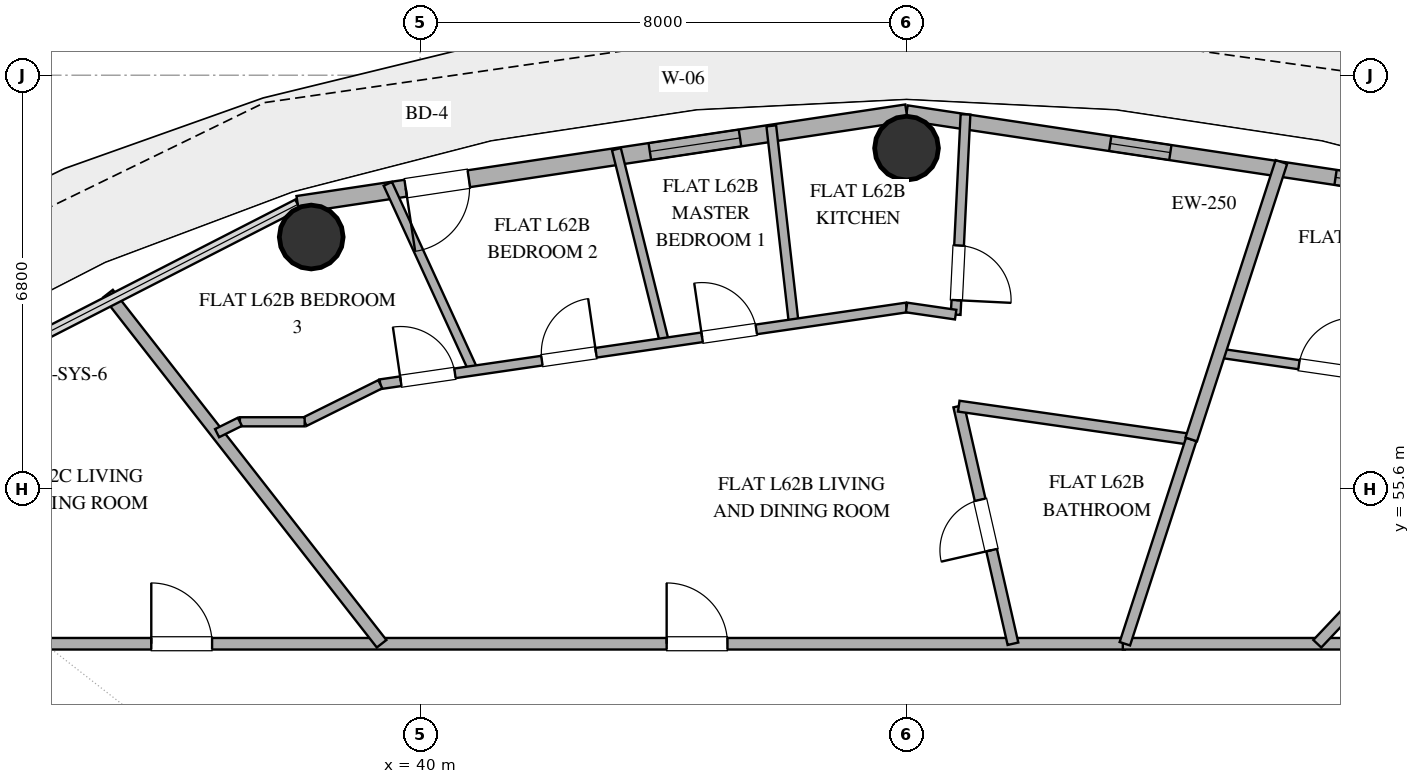
"""IFC4 building model, lengths in metres.
Left out: names, types, materials, properties, quantities, classifications, styles, units other than length and angle.
Written with IfcOpenShell. Run it as: python <this file> out.ifc"""

import sys

from ifc_helpers import new_model, si_unit, direction, frame, frame_2d, origin, origin_2d, place, context, subcontext, project, spatial, rectangle, hollow_circle, extrude, element, fill, save


model = new_model("IFC4")
c1 = context("Model", 3, precision=1e-05, world=origin(), true_north=direction((0.0, 1.0)))
c2 = subcontext(c1, "Body", "Model", "MODEL_VIEW")
j1 = project(units=[si_unit("LENGTHUNIT", "METRE"), si_unit("PLANEANGLEUNIT", "RADIAN")], contexts=[c1])
p1 = place(None, origin())
s1 = spatial("IfcSite", under=j1, at=p1, CompositionType="ELEMENT")
p2 = place(p1, origin())
s2 = spatial("IfcBuilding", under=s1, at=p2, CompositionType="ELEMENT")
p3 = place(p2, frame((0.0, 0.0, 242.4)))
s3 = spatial("IfcBuildingStorey", under=s2, at=p3, CompositionType="ELEMENT", Elevation=242.4)
for number, where, z_axis, x_axis in (
    (1, (48.0, 61.2, 0.0), (0.0, 0.0, 1.0), (1.0, 0.0, 0.0)),
    (2, (38.209, 59.739, 0.0), (0.0, 0.0, 1.0), (1.0, 0.0, 0.0)),
):
    element("IfcColumn", number, at=place(p3, frame(where, z_axis=z_axis, x_axis=x_axis)), inside=s3, PredefinedType="COLUMN", context=c2, shape_type="SweptSolid", body=[
        extrude(hollow_circle(Radius=0.525, WallThickness=0.028, at=origin_2d()), origin(), (0.0, 0.0, 1.0), 3.36),
    ])
p4 = place(p3, frame((58.013, 60.274, 0.0), z_axis=(0.0, 0.0, 1.0), x_axis=(-0.988882522213, 0.148698881169, 0.0)))
e3 = element("IfcWall", 3, at=p4, inside=s3, PredefinedType="SOLIDWALL", context=c2, shape_type="SweptSolid", body=[
    extrude(rectangle(XDim=10.125, YDim=0.25, at=frame_2d((5.062, 0.0))), origin(), (0.0, 0.0, 1.0), 3.36),
])
p5 = place(p4, frame((1.99, 0.0, 1.42)))
e4 = element("IfcOpeningElement", 4, at=p5, cuts=e3, PredefinedType="OPENING", context=c2, shape_type="SweptSolid", body=[
    extrude(rectangle(XDim=1.0, YDim=1.05, at=frame_2d((0.5, 0.525))), frame((0.0, 0.135, 0.0), z_axis=(0.0, -1.0, 0.0), x_axis=(1.0, 0.0, 0.0)), (0.0, 0.0, 1.0), 0.27),
])
p6 = place(p4, frame((5.738, 0.0, 0.35)))
e5 = element("IfcOpeningElement", 5, at=p6, cuts=e3, PredefinedType="OPENING", context=c2, shape_type="SweptSolid", body=[
    extrude(rectangle(XDim=1.0, YDim=1.05, at=frame_2d((0.5, 0.525))), frame((0.0, 0.135, 0.0), z_axis=(0.0, -1.0, 0.0), x_axis=(1.0, 0.0, 0.0)), (0.0, 0.0, 1.0), 0.27),
])
p7 = place(p3, frame((48.0, 61.78, 0.0), z_axis=(0.0, 0.0, 1.0), x_axis=(-0.988882522213, -0.148698881169, 0.0)))
e6 = element("IfcWall", 6, at=p7, inside=s3, PredefinedType="SOLIDWALL", context=c2, shape_type="SweptSolid", body=[
    extrude(rectangle(XDim=10.125, YDim=0.28, at=frame_2d((5.062, 0.0))), origin(), (0.0, 0.0, 1.0), 3.36),
])
p8 = place(p7, frame((2.769, 0.0, 0.85)))
e7 = element("IfcOpeningElement", 7, at=p8, cuts=e6, PredefinedType="OPENING", context=c2, shape_type="SweptSolid", body=[
    extrude(rectangle(XDim=1.5, YDim=2.0, at=frame_2d((0.75, 1.0))), frame((0.0, 0.15, 0.0), z_axis=(0.0, -1.0, 0.0), x_axis=(1.0, 0.0, 0.0)), (0.0, 0.0, 1.0), 0.3),
])
p9 = place(p7, frame((7.28, 0.0, 0.0)))
e8 = element("IfcOpeningElement", 8, at=p9, cuts=e6, PredefinedType="OPENING", context=c2, shape_type="SweptSolid", body=[
    extrude(rectangle(XDim=1.05, YDim=2.2, at=frame_2d((0.525, 1.1))), frame((0.0, 0.15, 0.0), z_axis=(0.0, -1.0, 0.0), x_axis=(1.0, 0.0, 0.0)), (0.0, 0.0, 1.0), 0.3),
])
p10 = place(p3, frame((32.75, 53.05, 0.0), z_axis=(0.0, 0.0, 1.0), x_axis=(1.0, 0.0, 0.0)))
e9 = element("IfcWall", 9, at=p10, inside=s3, PredefinedType="PARTITIONING", context=c2, shape_type="SweptSolid", body=[
    extrude(rectangle(XDim=18.84, YDim=0.19, at=frame_2d((9.42, 0.0))), origin(), (0.0, 0.0, 1.0), 2.72),
])
p11 = place(p10, frame((11.305, 0.0, 0.0)))
e10 = element("IfcOpeningElement", 10, at=p11, cuts=e9, PredefinedType="OPENING", context=c2, shape_type="SweptSolid", body=[
    extrude(rectangle(XDim=1.0, YDim=2.2, at=frame_2d((0.5, 1.1))), frame((0.0, 0.105, 0.0), z_axis=(0.0, -1.0, 0.0), x_axis=(1.0, 0.0, 0.0)), (0.0, 0.0, 1.0), 0.21),
])
p12 = place(p10, frame((2.829, 0.0, 0.0)))
e11 = element("IfcOpeningElement", 11, at=p12, cuts=e9, PredefinedType="OPENING", context=c2, shape_type="SweptSolid", body=[
    extrude(rectangle(XDim=1.0, YDim=2.2, at=frame_2d((0.5, 1.1))), frame((0.0, 0.105, 0.0), z_axis=(0.0, -1.0, 0.0), x_axis=(1.0, 0.0, 0.0)), (0.0, 0.0, 1.0), 0.21),
])
p13 = place(p3, frame((51.557, 53.05, 0.0), z_axis=(0.0, 0.0, 1.0), x_axis=(1.0, 0.0, 0.0)))
e12 = element("IfcWall", 12, at=p13, inside=s3, PredefinedType="PARTITIONING", context=c2, shape_type="SweptSolid", body=[
    extrude(rectangle(XDim=11.693, YDim=0.19, at=frame_2d((5.847, 0.0))), origin(), (0.0, 0.0, 1.0), 2.72),
])
p14 = place(p3, frame((39.367, 53.05, 0.0), z_axis=(0.0, 0.0, 1.0), x_axis=(-0.615657656631, 0.788013737083, 0.0)))
e13 = element("IfcWall", 13, at=p14, inside=s3, PredefinedType="PARTITIONING", context=c2, shape_type="SweptSolid", body=[
    extrude(rectangle(XDim=7.308, YDim=0.2, at=frame_2d((3.654, 0.0))), origin(), (0.0, 0.0, 1.0), 2.72),
])
p15 = place(p3, frame((49.75, 53.05, 0.0), z_axis=(0.0, 0.0, 1.0), x_axis=(-0.222474116201, 0.974938596846, 0.0)))
e14 = element("IfcWall", 14, at=p15, inside=s3, PredefinedType="PLUMBINGWALL", context=c2, shape_type="SweptSolid", body=[
    extrude(rectangle(XDim=4.008, YDim=0.18, at=frame_2d((2.004, 0.0))), origin(), (0.0, 0.0, 1.0), 2.72),
])
p16 = place(p15, frame((1.579, 0.0, 0.0)))
e15 = element("IfcOpeningElement", 15, at=p16, cuts=e14, PredefinedType="OPENING", context=c2, shape_type="SweptSolid", body=[
    extrude(rectangle(XDim=0.85, YDim=2.1, at=frame_2d((0.425, 1.05))), frame((0.0, 0.1, 0.0), z_axis=(0.0, -1.0, 0.0), x_axis=(1.0, 0.0, 0.0)), (0.0, 0.0, 1.0), 0.2),
])
p17 = place(p3, frame((48.859, 56.957, 0.0), z_axis=(0.0, 0.0, 1.0), x_axis=(0.989916598229, -0.141651433282, 0.0)))
e16 = element("IfcWall", 16, at=p17, inside=s3, PredefinedType="PLUMBINGWALL", context=c2, shape_type="SweptSolid", body=[
    extrude(rectangle(XDim=3.863, YDim=0.18, at=frame_2d((1.931, 0.0))), origin(), (0.0, 0.0, 1.0), 2.72),
])
p18 = place(p3, frame((53.144, 57.83, 0.0), z_axis=(0.0, 0.0, 1.0), x_axis=(0.98952683964, -0.144348999414, 0.0)))
e17 = element("IfcWall", 17, at=p18, inside=s3, PredefinedType="PARTITIONING", context=c2, shape_type="SweptSolid", body=[
    extrude(rectangle(XDim=3.548, YDim=0.15, at=frame_2d((1.774, 0.0))), origin(), (0.0, 0.0, 1.0), 2.72),
])
p19 = place(p18, frame((1.324, 0.0, 0.0)))
e18 = element("IfcOpeningElement", 18, at=p19, cuts=e17, PredefinedType="OPENING", context=c2, shape_type="SweptSolid", body=[
    extrude(rectangle(XDim=0.9, YDim=2.1, at=frame_2d((0.45, 1.05))), frame((0.0, 0.085, 0.0), z_axis=(0.0, -1.0, 0.0), x_axis=(1.0, 0.0, 0.0)), (0.0, 0.0, 1.0), 0.17),
])
p20 = place(p3, frame((52.682, 56.41, 0.0), z_axis=(0.0, 0.0, 1.0), x_axis=(-0.309025133622, -0.951053871655, 0.0)))
e19 = element("IfcWall", 19, at=p20, inside=s3, PredefinedType="PLUMBINGWALL", context=c2, shape_type="SweptSolid", body=[
    extrude(rectangle(XDim=3.533, YDim=0.18, at=frame_2d((1.767, 0.0))), origin(), (0.0, 0.0, 1.0), 2.72),
])
p21 = place(p3, frame((40.877, 57.541, 0.0), z_axis=(0.0, 0.0, 1.0), x_axis=(-0.41664724869, 0.90906824285, 0.0)))
e20 = element("IfcWall", 20, at=p21, inside=s3, PredefinedType="PARTITIONING", context=c2, shape_type="SweptSolid", body=[
    extrude(rectangle(XDim=3.38, YDim=0.15, at=frame_2d((1.69, 0.0))), origin(), (0.0, 0.0, 1.0), 2.72),
])
p22 = place(p3, frame((54.165, 60.973, 0.0), z_axis=(0.0, 0.0, 1.0), x_axis=(-0.309012424199, -0.951058001223, 0.0)))
e21 = element("IfcWall", 21, at=p22, inside=s3, PredefinedType="PARTITIONING", context=c2, shape_type="SweptSolid", body=[
    extrude(rectangle(XDim=4.797, YDim=0.2, at=frame_2d((2.399, 0.0))), origin(), (0.0, 0.0, 1.0), 2.72),
])
p23 = place(p3, frame((57.021, 55.446, 0.0), z_axis=(0.0, 0.0, 1.0), x_axis=(-0.686947406922, -0.726707135044, 0.0)))
e22 = element("IfcWall", 22, at=p23, inside=s3, PredefinedType="PLUMBINGWALL", context=c2, shape_type="SweptSolid", body=[
    extrude(rectangle(XDim=3.297, YDim=0.18, at=frame_2d((1.649, 0.0))), origin(), (0.0, 0.0, 1.0), 2.72),
])
p24 = place(p23, frame((1.224, 0.0, 0.0)))
e23 = element("IfcOpeningElement", 23, at=p24, cuts=e22, PredefinedType="OPENING", context=c2, shape_type="SweptSolid", body=[
    extrude(rectangle(XDim=0.85, YDim=2.1, at=frame_2d((0.425, 1.05))), frame((0.0, 0.1, 0.0), z_axis=(0.0, -1.0, 0.0), x_axis=(1.0, 0.0, 0.0)), (0.0, 0.0, 1.0), 0.2),
])
p25 = place(p3, frame((48.969, 61.755, 0.0), z_axis=(0.0, 0.0, 1.0), x_axis=(-0.04902528139, -0.998797537935, 0.0)))
e24 = element("IfcWall", 24, at=p25, inside=s3, PredefinedType="PLUMBINGWALL", context=c2, shape_type="SweptSolid", body=[
    extrude(rectangle(XDim=3.297, YDim=0.16, at=frame_2d((1.648, 0.0))), origin(), (0.0, 0.0, 1.0), 2.72),
])
p26 = place(p25, frame((2.158, 0.0, 0.0)))
e25 = element("IfcOpeningElement", 25, at=p26, cuts=e24, PredefinedType="OPENING", context=c2, shape_type="SweptSolid", body=[
    extrude(rectangle(XDim=0.9, YDim=2.1, at=frame_2d((0.45, 1.05))), frame((0.0, 0.09, 0.0), z_axis=(0.0, -1.0, 0.0), x_axis=(1.0, 0.0, 0.0)), (0.0, 0.0, 1.0), 0.18),
])
p27 = place(p3, frame((43.229, 61.183, 0.0), z_axis=(0.0, 0.0, 1.0), x_axis=(0.241414802643, -0.970422018023, 0.0)))
e26 = element("IfcWall", 26, at=p27, inside=s3, PredefinedType="PARTITIONING", context=c2, shape_type="SweptSolid", body=[
    extrude(rectangle(XDim=3.281, YDim=0.15, at=frame_2d((1.64, 0.0))), origin(), (0.0, 0.0, 1.0), 2.72),
])
p28 = place(p3, frame((46.146, 58.31, 0.0), z_axis=(0.0, 0.0, 1.0), x_axis=(-0.11298154415, 0.993597086691, 0.0)))
e27 = element("IfcWall", 27, at=p28, inside=s3, PredefinedType="PLUMBINGWALL", context=c2, shape_type="SweptSolid", body=[
    extrude(rectangle(XDim=3.278, YDim=0.16, at=frame_2d((1.639, 0.0))), origin(), (0.0, 0.0, 1.0), 2.72),
])
p29 = place(p3, frame((39.345, 57.318, 0.0), z_axis=(0.0, 0.0, 1.0), x_axis=(0.989540121389, 0.144257922351, 0.0)))
e28 = element("IfcWall", 28, at=p29, inside=s3, PredefinedType="PLUMBINGWALL", context=c2, shape_type="SweptSolid", body=[
    extrude(rectangle(XDim=8.746, YDim=0.16, at=frame_2d((4.373, 0.0))), origin(), (0.0, 0.0, 1.0), 2.72),
])
p30 = place(p29, frame((2.686, 0.0, 0.0)))
e29 = element("IfcOpeningElement", 29, at=p30, cuts=e28, PredefinedType="OPENING", context=c2, shape_type="SweptSolid", body=[
    extrude(rectangle(XDim=0.9, YDim=2.1, at=frame_2d((0.45, 1.05))), frame((0.0, 0.09, 0.0), z_axis=(0.0, -1.0, 0.0), x_axis=(1.0, 0.0, 0.0)), (0.0, 0.0, 1.0), 0.18),
])
p31 = place(p29, frame((5.349, 0.0, 0.0)))
e30 = element("IfcOpeningElement", 30, at=p31, cuts=e28, PredefinedType="OPENING", context=c2, shape_type="SweptSolid", body=[
    extrude(rectangle(XDim=0.9, YDim=2.1, at=frame_2d((0.45, 1.05))), frame((0.0, 0.09, 0.0), z_axis=(0.0, -1.0, 0.0), x_axis=(1.0, 0.0, 0.0)), (0.0, 0.0, 1.0), 0.18),
])
p32 = place(p29, frame((0.341, 0.0, 0.0)))
e31 = element("IfcOpeningElement", 31, at=p32, cuts=e28, PredefinedType="OPENING", context=c2, shape_type="SweptSolid", body=[
    extrude(rectangle(XDim=0.9, YDim=2.1, at=frame_2d((0.45, 1.05))), frame((0.0, 0.09, 0.0), z_axis=(0.0, -1.0, 0.0), x_axis=(1.0, 0.0, 0.0)), (0.0, 0.0, 1.0), 0.18),
])
p33 = place(p3, frame((38.101, 56.7, 0.0), z_axis=(0.0, 0.0, 1.0), x_axis=(0.895584310315, 0.444891833053, 0.0)))
e32 = element("IfcWall", 32, at=p33, inside=s3, PredefinedType="PARTITIONING", context=c2, shape_type="SweptSolid", body=[
    extrude(rectangle(XDim=1.389, YDim=0.15, at=frame_2d((0.694, 0.0))), origin(), (0.0, 0.0, 1.0), 2.72),
])
p34 = place(p3, frame((37.036, 56.7, 0.0), z_axis=(0.0, 0.0, 1.0), x_axis=(1.0, 0.0, 0.0)))
e33 = element("IfcWall", 33, at=p34, inside=s3, PredefinedType="PARTITIONING", context=c2, shape_type="SweptSolid", body=[
    extrude(rectangle(XDim=1.065, YDim=0.15, at=frame_2d((0.533, 0.0))), origin(), (0.0, 0.0, 1.0), 2.72),
])
p35 = place(p3, frame((48.808, 58.462, 0.0), z_axis=(0.0, 0.0, 1.0), x_axis=(-0.989514290885, 0.144434996222, 0.0)))
e34 = element("IfcWall", 34, at=p35, inside=s3, PredefinedType="PLUMBINGWALL", context=c2, shape_type="SweptSolid", body=[
    extrude(rectangle(XDim=0.816, YDim=0.16, at=frame_2d((0.408, 0.0))), origin(), (0.0, 0.0, 1.0), 2.72),
])
p36 = place(p3, frame((36.661, 56.513, 0.0), z_axis=(0.0, 0.0, 1.0), x_axis=(0.895473432012, 0.445114965554, 0.0)))
e35 = element("IfcWall", 35, at=p36, inside=s3, PredefinedType="PARTITIONING", context=c2, shape_type="SweptSolid", body=[
    extrude(rectangle(XDim=0.419, YDim=0.15, at=frame_2d((0.209, 0.0))), origin(), (0.0, 0.0, 1.0), 2.72),
])
p37 = place(p8, origin())
e36 = element("IfcWindow", 36, at=p37, inside=s3, PartitioningType="SINGLE_PANEL", PredefinedType="WINDOW", context=c2, shape_type="SweptSolid", body=[
    extrude(rectangle(XDim=1.5, YDim=2.0, at=frame_2d((0.75, 1.0))), frame((0.0, 0.03, 0.0), z_axis=(0.0, -1.0, 0.0), x_axis=(1.0, 0.0, 0.0)), (0.0, 0.0, 1.0), 0.06),
])
fill(e7, e36)
p38 = place(p9, origin())
e37 = element("IfcDoor", 37, at=p38, inside=s3, OperationType="SINGLE_SWING_RIGHT", PredefinedType="DOOR", context=c2, shape_type="SweptSolid", body=[
    extrude(rectangle(XDim=1.05, YDim=2.2, at=frame_2d((0.525, 1.1))), frame((0.0, 0.025, 0.0), z_axis=(0.0, -1.0, 0.0), x_axis=(1.0, 0.0, 0.0)), (0.0, 0.0, 1.0), 0.05),
])
fill(e8, e37)
p39 = place(p5, origin())
e38 = element("IfcWindow", 38, at=p39, inside=s3, PartitioningType="SINGLE_PANEL", PredefinedType="WINDOW", context=c2, shape_type="SweptSolid", body=[
    extrude(rectangle(XDim=1.0, YDim=1.05, at=frame_2d((0.5, 0.525))), frame((0.0, 0.03, 0.0), z_axis=(0.0, -1.0, 0.0), x_axis=(1.0, 0.0, 0.0)), (0.0, 0.0, 1.0), 0.06),
])
fill(e4, e38)
p40 = place(p6, origin())
e39 = element("IfcWindow", 39, at=p40, inside=s3, PartitioningType="SINGLE_PANEL", PredefinedType="WINDOW", context=c2, shape_type="SweptSolid", body=[
    extrude(rectangle(XDim=1.0, YDim=1.05, at=frame_2d((0.5, 0.525))), frame((0.0, 0.03, 0.0), z_axis=(0.0, -1.0, 0.0), x_axis=(1.0, 0.0, 0.0)), (0.0, 0.0, 1.0), 0.06),
])
fill(e5, e39)
p41 = place(p11, origin())
e40 = element("IfcDoor", 40, at=p41, inside=s3, OperationType="SINGLE_SWING_LEFT", PredefinedType="DOOR", context=c2, shape_type="SweptSolid", body=[
    extrude(rectangle(XDim=1.0, YDim=2.2, at=frame_2d((0.5, 1.1))), frame((0.0, 0.025, 0.0), z_axis=(0.0, -1.0, 0.0), x_axis=(1.0, 0.0, 0.0)), (0.0, 0.0, 1.0), 0.05),
])
fill(e10, e40)
p42 = place(p12, origin())
e41 = element("IfcDoor", 41, at=p42, inside=s3, OperationType="SINGLE_SWING_LEFT", PredefinedType="DOOR", context=c2, shape_type="SweptSolid", body=[
    extrude(rectangle(XDim=1.0, YDim=2.2, at=frame_2d((0.5, 1.1))), frame((0.0, 0.025, 0.0), z_axis=(0.0, -1.0, 0.0), x_axis=(1.0, 0.0, 0.0)), (0.0, 0.0, 1.0), 0.05),
])
fill(e11, e41)
p43 = place(p16, origin())
e42 = element("IfcDoor", 42, at=p43, inside=s3, OperationType="SINGLE_SWING_LEFT", PredefinedType="DOOR", context=c2, shape_type="SweptSolid", body=[
    extrude(rectangle(XDim=0.85, YDim=2.1, at=frame_2d((0.425, 1.05))), frame((0.0, 0.025, 0.0), z_axis=(0.0, -1.0, 0.0), x_axis=(1.0, 0.0, 0.0)), (0.0, 0.0, 1.0), 0.05),
])
fill(e15, e42)
p44 = place(p19, origin())
e43 = element("IfcDoor", 43, at=p44, inside=s3, OperationType="SINGLE_SWING_RIGHT", PredefinedType="DOOR", context=c2, shape_type="SweptSolid", body=[
    extrude(rectangle(XDim=0.9, YDim=2.1, at=frame_2d((0.45, 1.05))), frame((0.0, 0.025, 0.0), z_axis=(0.0, -1.0, 0.0), x_axis=(1.0, 0.0, 0.0)), (0.0, 0.0, 1.0), 0.05),
])
fill(e18, e43)
p45 = place(p26, origin())
e44 = element("IfcDoor", 44, at=p45, inside=s3, OperationType="SINGLE_SWING_RIGHT", PredefinedType="DOOR", context=c2, shape_type="SweptSolid", body=[
    extrude(rectangle(XDim=0.9, YDim=2.1, at=frame_2d((0.45, 1.05))), frame((0.0, 0.025, 0.0), z_axis=(0.0, -1.0, 0.0), x_axis=(1.0, 0.0, 0.0)), (0.0, 0.0, 1.0), 0.05),
])
fill(e25, e44)
p46 = place(p30, origin())
e45 = element("IfcDoor", 45, at=p46, inside=s3, OperationType="SINGLE_SWING_RIGHT", PredefinedType="DOOR", context=c2, shape_type="SweptSolid", body=[
    extrude(rectangle(XDim=0.9, YDim=2.1, at=frame_2d((0.45, 1.05))), frame((0.0, 0.025, 0.0), z_axis=(0.0, -1.0, 0.0), x_axis=(1.0, 0.0, 0.0)), (0.0, 0.0, 1.0), 0.05),
])
fill(e29, e45)
p47 = place(p31, origin())
e46 = element("IfcDoor", 46, at=p47, inside=s3, OperationType="SINGLE_SWING_LEFT", PredefinedType="DOOR", context=c2, shape_type="SweptSolid", body=[
    extrude(rectangle(XDim=0.9, YDim=2.1, at=frame_2d((0.45, 1.05))), frame((0.0, 0.025, 0.0), z_axis=(0.0, -1.0, 0.0), x_axis=(1.0, 0.0, 0.0)), (0.0, 0.0, 1.0), 0.05),
])
fill(e30, e46)
p48 = place(p32, origin())
e47 = element("IfcDoor", 47, at=p48, inside=s3, OperationType="SINGLE_SWING_LEFT", PredefinedType="DOOR", context=c2, shape_type="SweptSolid", body=[
    extrude(rectangle(XDim=0.9, YDim=2.1, at=frame_2d((0.45, 1.05))), frame((0.0, 0.025, 0.0), z_axis=(0.0, -1.0, 0.0), x_axis=(1.0, 0.0, 0.0)), (0.0, 0.0, 1.0), 0.05),
])
fill(e31, e47)
save(model, sys.argv[1])
